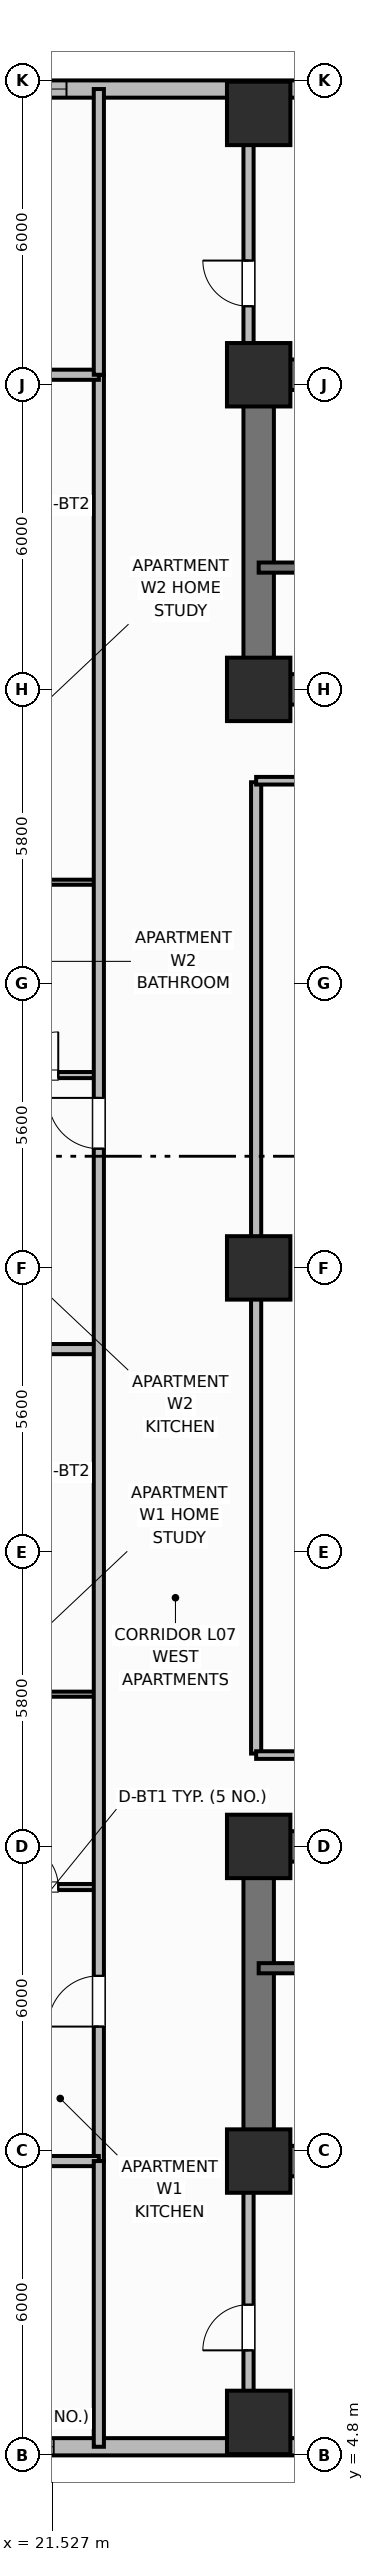
"""IFC4 building model, lengths in metres.
Left out: names, types, materials, properties, quantities, classifications, styles, units other than length and angle.
Written with IfcOpenShell. Run it as: python <this file> out.ifc"""

import sys

from ifc_helpers import new_model, si_unit, direction, frame, frame_2d, origin, origin_2d, place, context, subcontext, project, spatial, rectangle, extrude, element, fill, save


model = new_model("IFC4")
c1 = context("Model", 3, precision=1e-05, world=origin(), true_north=direction((0.0, 1.0)))
c2 = subcontext(c1, "Body", "Model", "MODEL_VIEW")
j1 = project(units=[si_unit("LENGTHUNIT", "METRE"), si_unit("PLANEANGLEUNIT", "RADIAN")], contexts=[c1])
p1 = place(None, origin())
s1 = spatial("IfcSite", under=j1, at=p1, CompositionType="ELEMENT")
p2 = place(p1, origin())
s2 = spatial("IfcBuilding", under=s1, at=p2, CompositionType="ELEMENT")
p3 = place(p2, frame((0.0, 0.0, 32.5)))
s3 = spatial("IfcBuildingStorey", under=s2, at=p3, CompositionType="ELEMENT", Elevation=32.5)
p4 = place(p3, frame((52.8, 10.6, 0.0), z_axis=(0.0, 0.0, 1.0), x_axis=(-1.0, 0.0, 0.0)))
e1 = element("IfcWall", 1, at=p4, inside=s3, PredefinedType="SHEAR", context=c2, shape_type="SweptSolid", body=[
    extrude(rectangle(XDim=27.2, YDim=0.6, at=frame_2d((13.6, 0.0))), origin(), (0.0, 0.0, 1.0), 3.7),
])
p5 = place(p3, frame((25.6, 10.9, 0.0), z_axis=(0.0, 0.0, 1.0), x_axis=(0.0, 1.0, 0.0)))
e2 = element("IfcWall", 2, at=p5, inside=s3, PredefinedType="SHEAR", context=c2, shape_type="SweptSolid", body=[
    extrude(rectangle(XDim=5.6, YDim=0.6, at=frame_2d((2.8, 0.0))), origin(), (0.0, 0.0, 1.0), 3.7),
])
p6 = place(p3, frame((25.6, 16.8, 0.0), z_axis=(0.0, 0.0, 1.0), x_axis=(1.0, 0.0, 0.0)))
e3 = element("IfcWall", 3, at=p6, inside=s3, PredefinedType="SHEAR", context=c2, shape_type="SweptSolid", body=[
    extrude(rectangle(XDim=27.2, YDim=0.6, at=frame_2d((13.6, 0.0))), origin(), (0.0, 0.0, 1.0), 3.7),
])
p7 = place(p6, frame((1.9, 0.0, 0.0)))
e4 = element("IfcOpeningElement", 4, at=p7, cuts=e3, PredefinedType="OPENING", context=c2, shape_type="SweptSolid", body=[
    extrude(rectangle(XDim=1.1, YDim=2.15, at=frame_2d((0.55, 1.075))), frame((0.0, 0.31, 0.0), z_axis=(0.0, -1.0, 0.0), x_axis=(1.0, 0.0, 0.0)), (0.0, 0.0, 1.0), 0.62),
])
p8 = place(p6, frame((13.0, 0.0, 0.0)))
e5 = element("IfcOpeningElement", 5, at=p8, cuts=e3, PredefinedType="OPENING", context=c2, shape_type="SweptSolid", body=[
    extrude(rectangle(XDim=1.2, YDim=2.15, at=frame_2d((0.6, 1.075))), frame((0.0, 0.31, 0.0), z_axis=(0.0, -1.0, 0.0), x_axis=(1.0, 0.0, 0.0)), (0.0, 0.0, 1.0), 0.62),
])
p9 = place(p6, frame((20.4, 0.0, 0.0)))
e6 = element("IfcOpeningElement", 6, at=p9, cuts=e3, PredefinedType="OPENING", context=c2, shape_type="SweptSolid", body=[
    extrude(rectangle(XDim=1.3, YDim=2.2, at=frame_2d((0.65, 1.1))), frame((0.0, 0.31, 0.0), z_axis=(0.0, -1.0, 0.0), x_axis=(1.0, 0.0, 0.0)), (0.0, 0.0, 1.0), 0.62),
])
p10 = place(p6, frame((24.65, 0.0, 0.0)))
e7 = element("IfcOpeningElement", 7, at=p10, cuts=e3, PredefinedType="OPENING", context=c2, shape_type="SweptSolid", body=[
    extrude(rectangle(XDim=0.85, YDim=2.1, at=frame_2d((0.425, 1.05))), frame((0.0, 0.31, 0.0), z_axis=(0.0, -1.0, 0.0), x_axis=(1.0, 0.0, 0.0)), (0.0, 0.0, 1.0), 0.62),
])
p11 = place(p3, frame((25.6, 45.8, 0.0), z_axis=(0.0, 0.0, 1.0), x_axis=(1.0, 0.0, 0.0)))
e8 = element("IfcWall", 8, at=p11, inside=s3, PredefinedType="SHEAR", context=c2, shape_type="SweptSolid", body=[
    extrude(rectangle(XDim=27.2, YDim=0.6, at=frame_2d((13.6, 0.0))), origin(), (0.0, 0.0, 1.0), 3.7),
])
p12 = place(p3, frame((25.6, 39.9, 0.0), z_axis=(0.0, 0.0, 1.0), x_axis=(0.0, 1.0, 0.0)))
e9 = element("IfcWall", 9, at=p12, inside=s3, PredefinedType="SHEAR", context=c2, shape_type="SweptSolid", body=[
    extrude(rectangle(XDim=5.6, YDim=0.6, at=frame_2d((2.8, 0.0))), origin(), (0.0, 0.0, 1.0), 3.7),
])
p13 = place(p3, frame((52.8, 39.6, 0.0), z_axis=(0.0, 0.0, 1.0), x_axis=(-1.0, 0.0, 0.0)))
e10 = element("IfcWall", 10, at=p13, inside=s3, PredefinedType="SHEAR", context=c2, shape_type="SweptSolid", body=[
    extrude(rectangle(XDim=27.2, YDim=0.6, at=frame_2d((13.6, 0.0))), origin(), (0.0, 0.0, 1.0), 3.7),
])
p14 = place(p13, frame((24.2, 0.0, 0.0)))
e11 = element("IfcOpeningElement", 11, at=p14, cuts=e10, PredefinedType="OPENING", context=c2, shape_type="SweptSolid", body=[
    extrude(rectangle(XDim=1.1, YDim=2.15, at=frame_2d((0.55, 1.075))), frame((0.0, 0.31, 0.0), z_axis=(0.0, -1.0, 0.0), x_axis=(1.0, 0.0, 0.0)), (0.0, 0.0, 1.0), 0.62),
])
p15 = place(p13, frame((15.1, 0.0, 0.0)))
e12 = element("IfcOpeningElement", 12, at=p15, cuts=e10, PredefinedType="OPENING", context=c2, shape_type="SweptSolid", body=[
    extrude(rectangle(XDim=1.2, YDim=2.15, at=frame_2d((0.6, 1.075))), frame((0.0, 0.31, 0.0), z_axis=(0.0, -1.0, 0.0), x_axis=(1.0, 0.0, 0.0)), (0.0, 0.0, 1.0), 0.62),
])
p16 = place(p13, frame((11.6, 0.0, 0.0)))
e13 = element("IfcOpeningElement", 13, at=p16, cuts=e10, PredefinedType="OPENING", context=c2, shape_type="SweptSolid", body=[
    extrude(rectangle(XDim=0.9, YDim=2.1, at=frame_2d((0.45, 1.05))), frame((0.0, 0.31, 0.0), z_axis=(0.0, -1.0, 0.0), x_axis=(1.0, 0.0, 0.0)), (0.0, 0.0, 1.0), 0.62),
])
p17 = place(p13, frame((3.6, 0.0, 0.0)))
e14 = element("IfcOpeningElement", 14, at=p17, cuts=e10, PredefinedType="OPENING", context=c2, shape_type="SweptSolid", body=[
    extrude(rectangle(XDim=1.0, YDim=2.15, at=frame_2d((0.5, 1.075))), frame((0.0, 0.31, 0.0), z_axis=(0.0, -1.0, 0.0), x_axis=(1.0, 0.0, 0.0)), (0.0, 0.0, 1.0), 0.62),
])
for number, where, z_axis, x_axis in (
    (15, (25.6, 10.6, 0.0), (0.0, 0.0, 1.0), (1.0, 0.0, 0.0)),
    (16, (25.6, 16.8, 0.0), (0.0, 0.0, 1.0), (1.0, 0.0, 0.0)),
    (17, (25.6, 39.6, 0.0), (0.0, 0.0, 1.0), (1.0, 0.0, 0.0)),
    (18, (25.6, 45.8, 0.0), (0.0, 0.0, 1.0), (1.0, 0.0, 0.0)),
    (19, (25.6, 28.2, 0.0), (0.0, 0.0, 1.0), (1.0, 0.0, 0.0)),
    (20, (25.6, 5.45, 0.0), (0.0, 0.0, 1.0), (1.0, 0.0, 0.0)),
    (21, (25.6, 50.95, 0.0), (0.0, 0.0, 1.0), (1.0, 0.0, 0.0)),
):
    element("IfcColumn", number, at=place(p3, frame(where, z_axis=z_axis, x_axis=x_axis)), inside=s3, PredefinedType="COLUMN", context=c2, shape_type="SweptSolid", body=[
        extrude(rectangle(XDim=1.25, YDim=1.25, at=origin_2d()), origin(), (0.0, 0.0, 1.0), 3.7),
    ])
p18 = place(p3, frame((18.6, 4.97, 0.0), z_axis=(0.0, 0.0, 1.0), x_axis=(1.0, 0.0, 0.0)))
e22 = element("IfcWall", 22, at=p18, inside=s3, PredefinedType="SOLIDWALL", context=c2, shape_type="SweptSolid", body=[
    extrude(rectangle(XDim=17.4, YDim=0.34, at=frame_2d((8.7, 0.0))), origin(), (0.0, 0.0, 1.0), 2.7),
])
p19 = place(p18, frame((1.56, 0.0, 0.73)))
e23 = element("IfcOpeningElement", 23, at=p19, cuts=e22, PredefinedType="OPENING", context=c2, shape_type="SweptSolid", body=[
    extrude(rectangle(XDim=1.4, YDim=1.85, at=frame_2d((0.7, 0.925))), frame((0.0, 0.18, 0.0), z_axis=(0.0, -1.0, 0.0), x_axis=(1.0, 0.0, 0.0)), (0.0, 0.0, 1.0), 0.36),
])
p20 = place(p18, frame((8.35, 0.0, 0.73)))
e24 = element("IfcOpeningElement", 24, at=p20, cuts=e22, PredefinedType="OPENING", context=c2, shape_type="SweptSolid", body=[
    extrude(rectangle(XDim=1.4, YDim=1.85, at=frame_2d((0.7, 0.925))), frame((0.0, 0.18, 0.0), z_axis=(0.0, -1.0, 0.0), x_axis=(1.0, 0.0, 0.0)), (0.0, 0.0, 1.0), 0.36),
])
p21 = place(p18, frame((11.22, 0.0, 0.73)))
e25 = element("IfcOpeningElement", 25, at=p21, cuts=e22, PredefinedType="OPENING", context=c2, shape_type="SweptSolid", body=[
    extrude(rectangle(XDim=1.4, YDim=1.85, at=frame_2d((0.7, 0.925))), frame((0.0, 0.18, 0.0), z_axis=(0.0, -1.0, 0.0), x_axis=(1.0, 0.0, 0.0)), (0.0, 0.0, 1.0), 0.36),
])
p22 = place(p18, frame((13.74, 0.0, 0.73)))
e26 = element("IfcOpeningElement", 26, at=p22, cuts=e22, PredefinedType="OPENING", context=c2, shape_type="SweptSolid", body=[
    extrude(rectangle(XDim=1.4, YDim=1.85, at=frame_2d((0.7, 0.925))), frame((0.0, 0.18, 0.0), z_axis=(0.0, -1.0, 0.0), x_axis=(1.0, 0.0, 0.0)), (0.0, 0.0, 1.0), 0.36),
])
p23 = place(p3, frame((36.0, 51.43, 0.0), z_axis=(0.0, 0.0, 1.0), x_axis=(-1.0, 0.0, 0.0)))
e27 = element("IfcWall", 27, at=p23, inside=s3, PredefinedType="SOLIDWALL", context=c2, shape_type="SweptSolid", body=[
    extrude(rectangle(XDim=17.4, YDim=0.34, at=frame_2d((8.7, 0.0))), origin(), (0.0, 0.0, 1.0), 2.7),
])
p24 = place(p23, frame((5.788, 0.0, 0.73)))
e28 = element("IfcOpeningElement", 28, at=p24, cuts=e27, PredefinedType="OPENING", context=c2, shape_type="SweptSolid", body=[
    extrude(rectangle(XDim=1.8, YDim=1.85, at=frame_2d((0.9, 0.925))), frame((0.0, 0.18, 0.0), z_axis=(0.0, -1.0, 0.0), x_axis=(1.0, 0.0, 0.0)), (0.0, 0.0, 1.0), 0.36),
])
p25 = place(p23, frame((14.188, 0.0, 0.73)))
e29 = element("IfcOpeningElement", 29, at=p25, cuts=e27, PredefinedType="OPENING", context=c2, shape_type="SweptSolid", body=[
    extrude(rectangle(XDim=1.8, YDim=1.85, at=frame_2d((0.9, 0.925))), frame((0.0, 0.18, 0.0), z_axis=(0.0, -1.0, 0.0), x_axis=(1.0, 0.0, 0.0)), (0.0, 0.0, 1.0), 0.36),
])
p26 = place(p3, frame((25.6, 14.4, 0.0), z_axis=(0.0, 0.0, 1.0), x_axis=(1.0, 0.0, 0.0)))
e30 = element("IfcWall", 30, at=p26, inside=s3, PredefinedType="SHEAR", context=c2, shape_type="SweptSolid", body=[
    extrude(rectangle(XDim=9.55, YDim=0.2, at=frame_2d((4.775, 0.0))), origin(), (0.0, 0.0, 1.0), 3.7),
])
p27 = place(p26, frame((1.05, 0.0, 0.0)))
e31 = element("IfcOpeningElement", 31, at=p27, cuts=e30, PredefinedType="OPENING", context=c2, shape_type="SweptSolid", body=[
    extrude(rectangle(XDim=1.1, YDim=2.15, at=frame_2d((0.55, 1.075))), frame((0.0, 0.11, 0.0), z_axis=(0.0, -1.0, 0.0), x_axis=(1.0, 0.0, 0.0)), (0.0, 0.0, 1.0), 0.22),
])
p28 = place(p3, frame((35.15, 42.0, 0.0), z_axis=(0.0, 0.0, 1.0), x_axis=(-1.0, 0.0, 0.0)))
e32 = element("IfcWall", 32, at=p28, inside=s3, PredefinedType="SHEAR", context=c2, shape_type="SweptSolid", body=[
    extrude(rectangle(XDim=9.55, YDim=0.2, at=frame_2d((4.775, 0.0))), origin(), (0.0, 0.0, 1.0), 3.7),
])
p29 = place(p28, frame((7.25, 0.0, 0.0)))
e33 = element("IfcOpeningElement", 33, at=p29, cuts=e32, PredefinedType="OPENING", context=c2, shape_type="SweptSolid", body=[
    extrude(rectangle(XDim=1.1, YDim=2.15, at=frame_2d((0.55, 1.075))), frame((0.0, 0.11, 0.0), z_axis=(0.0, -1.0, 0.0), x_axis=(1.0, 0.0, 0.0)), (0.0, 0.0, 1.0), 0.22),
])
p30 = place(p3, frame((25.55, 18.63, 0.0), z_axis=(0.0, 0.0, 1.0), x_axis=(0.0, 1.0, 0.0)))
e34 = element("IfcWall", 34, at=p30, inside=s3, PredefinedType="PARTITIONING", context=c2, shape_type="SweptSolid", body=[
    extrude(rectangle(XDim=19.14, YDim=0.2, at=frame_2d((9.57, 0.0))), origin(), (0.0, 0.0, 1.0), 2.53),
])
for number, where, z_axis, x_axis in (
    (35, (25.55, 18.6, 0.0), (0.0, 0.0, 1.0), (1.0, 0.0, 0.0)),
    (36, (25.55, 37.8, 0.0), (0.0, 0.0, 1.0), (1.0, 0.0, 0.0)),
):
    element("IfcWall", number, at=place(p3, frame(where, z_axis=z_axis, x_axis=x_axis)), inside=s3, PredefinedType="PARTITIONING", context=c2, shape_type="SweptSolid", body=[
        extrude(rectangle(XDim=12.5, YDim=0.15, at=frame_2d((6.25, 0.0))), origin(), (0.0, 0.0, 1.0), 2.53),
    ])
p31 = place(p3, frame((20.2, 16.0, 0.0), z_axis=(0.0, 0.0, 1.0), x_axis=(1.0, 0.0, 0.0)))
e37 = element("IfcWall", 37, at=p31, inside=s3, PredefinedType="PARTITIONING", context=c2, shape_type="SweptSolid", body=[
    extrude(rectangle(XDim=2.25, YDim=0.12, at=frame_2d((1.125, 0.0))), origin(), (0.0, 0.0, 1.0), 2.53),
])
p32 = place(p31, frame((0.6, 0.0, 0.0)))
e38 = element("IfcOpeningElement", 38, at=p32, cuts=e37, PredefinedType="OPENING", context=c2, shape_type="SweptSolid", body=[
    extrude(rectangle(XDim=0.85, YDim=2.1, at=frame_2d((0.425, 1.05))), frame((0.0, 0.07, 0.0), z_axis=(0.0, -1.0, 0.0), x_axis=(1.0, 0.0, 0.0)), (0.0, 0.0, 1.0), 0.14),
])
p33 = place(p3, frame((20.2, 19.8, 0.0), z_axis=(0.0, 0.0, 1.0), x_axis=(1.0, 0.0, 0.0)))
e39 = element("IfcWall", 39, at=p33, inside=s3, PredefinedType="PARTITIONING", context=c2, shape_type="SweptSolid", body=[
    extrude(rectangle(XDim=2.25, YDim=0.1, at=frame_2d((1.125, 0.0))), origin(), (0.0, 0.0, 1.0), 2.53),
])
p34 = place(p3, frame((14.884, 26.6, 0.0), z_axis=(0.0, 0.0, 1.0), x_axis=(1.0, 0.0, 0.0)))
e40 = element("IfcWall", 40, at=p34, inside=s3, PredefinedType="PARTITIONING", context=c2, shape_type="SweptSolid", body=[
    extrude(rectangle(XDim=7.566, YDim=0.2, at=frame_2d((3.783, 0.0))), origin(), (0.0, 0.0, 1.0), 2.53),
])
p35 = place(p3, frame((20.2, 32.0, 0.0), z_axis=(0.0, 0.0, 1.0), x_axis=(1.0, 0.0, 0.0)))
e41 = element("IfcWall", 41, at=p35, inside=s3, PredefinedType="PARTITIONING", context=c2, shape_type="SweptSolid", body=[
    extrude(rectangle(XDim=2.25, YDim=0.12, at=frame_2d((1.125, 0.0))), origin(), (0.0, 0.0, 1.0), 2.53),
])
p36 = place(p35, frame((0.6, 0.0, 0.0)))
e42 = element("IfcOpeningElement", 42, at=p36, cuts=e41, PredefinedType="OPENING", context=c2, shape_type="SweptSolid", body=[
    extrude(rectangle(XDim=0.85, YDim=2.1, at=frame_2d((0.425, 1.05))), frame((0.0, 0.07, 0.0), z_axis=(0.0, -1.0, 0.0), x_axis=(1.0, 0.0, 0.0)), (0.0, 0.0, 1.0), 0.14),
])
p37 = place(p3, frame((20.2, 35.8, 0.0), z_axis=(0.0, 0.0, 1.0), x_axis=(1.0, 0.0, 0.0)))
e43 = element("IfcWall", 43, at=p37, inside=s3, PredefinedType="PARTITIONING", context=c2, shape_type="SweptSolid", body=[
    extrude(rectangle(XDim=2.25, YDim=0.1, at=frame_2d((1.125, 0.0))), origin(), (0.0, 0.0, 1.0), 2.53),
])
p38 = place(p3, frame((22.45, 10.6, 0.0), z_axis=(0.0, 0.0, 1.0), x_axis=(0.0, 1.0, 0.0)))
e44 = element("IfcWall", 44, at=p38, inside=s3, PredefinedType="PARTITIONING", context=c2, shape_type="SweptSolid", body=[
    extrude(rectangle(XDim=35.2, YDim=0.2, at=frame_2d((17.6, 0.0))), origin(), (0.0, 0.0, 1.0), 2.53),
])
p39 = place(p38, frame((2.65, 0.0, 0.0)))
e45 = element("IfcOpeningElement", 45, at=p39, cuts=e44, PredefinedType="OPENING", context=c2, shape_type="SweptSolid", body=[
    extrude(rectangle(XDim=1.0, YDim=2.15, at=frame_2d((0.5, 1.075))), frame((0.0, 0.11, 0.0), z_axis=(0.0, -1.0, 0.0), x_axis=(1.0, 0.0, 0.0)), (0.0, 0.0, 1.0), 0.22),
])
p40 = place(p38, frame((19.95, 0.0, 0.0)))
e46 = element("IfcOpeningElement", 46, at=p40, cuts=e44, PredefinedType="OPENING", context=c2, shape_type="SweptSolid", body=[
    extrude(rectangle(XDim=1.0, YDim=2.15, at=frame_2d((0.5, 1.075))), frame((0.0, 0.11, 0.0), z_axis=(0.0, -1.0, 0.0), x_axis=(1.0, 0.0, 0.0)), (0.0, 0.0, 1.0), 0.22),
])
for number, where, z_axis, x_axis in (
    (47, (14.99, 10.6, 0.0), (0.0, 0.0, 1.0), (1.0, 0.0, 0.0)),
    (48, (14.99, 45.8, 0.0), (0.0, 0.0, 1.0), (1.0, 0.0, 0.0)),
):
    element("IfcWall", number, at=place(p3, frame(where, z_axis=z_axis, x_axis=x_axis)), inside=s3, PredefinedType="PARTITIONING", context=c2, shape_type="SweptSolid", body=[
        extrude(rectangle(XDim=7.46, YDim=0.2, at=frame_2d((3.73, 0.0))), origin(), (0.0, 0.0, 1.0), 2.53),
    ])
p41 = place(p3, frame((22.45, 4.97, 0.0), z_axis=(0.0, 0.0, 1.0), x_axis=(0.0, 1.0, 0.0)))
e49 = element("IfcWall", 49, at=p41, inside=s3, PredefinedType="PARTITIONING", context=c2, shape_type="SweptSolid", body=[
    extrude(rectangle(XDim=5.63, YDim=0.2, at=frame_2d((2.815, 0.0))), origin(), (0.0, 0.0, 1.0), 2.53),
])
p42 = place(p3, frame((22.45, 45.8, 0.0), z_axis=(0.0, 0.0, 1.0), x_axis=(0.0, 1.0, 0.0)))
e50 = element("IfcWall", 50, at=p42, inside=s3, PredefinedType="PARTITIONING", context=c2, shape_type="SweptSolid", body=[
    extrude(rectangle(XDim=5.63, YDim=0.2, at=frame_2d((2.815, 0.0))), origin(), (0.0, 0.0, 1.0), 2.53),
])
p43 = place(p3, frame((25.4, 5.57, 0.0), z_axis=(0.0, 0.0, 1.0), x_axis=(0.0, 1.0, 0.0)))
e51 = element("IfcWall", 51, at=p43, inside=s3, PredefinedType="PARTITIONING", context=c2, shape_type="SweptSolid", body=[
    extrude(rectangle(XDim=4.73, YDim=0.2, at=frame_2d((2.365, 0.0))), origin(), (0.0, 0.0, 1.0), 2.53),
])
p44 = place(p43, frame((1.3, 0.0, 0.0)))
e52 = element("IfcOpeningElement", 52, at=p44, cuts=e51, PredefinedType="OPENING", context=c2, shape_type="SweptSolid", body=[
    extrude(rectangle(XDim=0.9, YDim=2.1, at=frame_2d((0.45, 1.05))), frame((0.0, 0.11, 0.0), z_axis=(0.0, -1.0, 0.0), x_axis=(1.0, 0.0, 0.0)), (0.0, 0.0, 1.0), 0.22),
])
p45 = place(p3, frame((25.4, 46.1, 0.0), z_axis=(0.0, 0.0, 1.0), x_axis=(0.0, 1.0, 0.0)))
e53 = element("IfcWall", 53, at=p45, inside=s3, PredefinedType="PARTITIONING", context=c2, shape_type="SweptSolid", body=[
    extrude(rectangle(XDim=4.73, YDim=0.2, at=frame_2d((2.365, 0.0))), origin(), (0.0, 0.0, 1.0), 2.53),
])
p46 = place(p45, frame((1.05, 0.0, 0.0)))
e54 = element("IfcOpeningElement", 54, at=p46, cuts=e53, PredefinedType="OPENING", context=c2, shape_type="SweptSolid", body=[
    extrude(rectangle(XDim=0.9, YDim=2.1, at=frame_2d((0.45, 1.05))), frame((0.0, 0.11, 0.0), z_axis=(0.0, -1.0, 0.0), x_axis=(1.0, 0.0, 0.0)), (0.0, 0.0, 1.0), 0.22),
])
p47 = place(p19, origin())
e55 = element("IfcWindow", 55, at=p47, inside=s3, PartitioningType="SINGLE_PANEL", PredefinedType="WINDOW", context=c2, shape_type="SweptSolid", body=[
    extrude(rectangle(XDim=1.4, YDim=1.85, at=frame_2d((0.7, 0.925))), frame((0.0, 0.03, 0.0), z_axis=(0.0, -1.0, 0.0), x_axis=(1.0, 0.0, 0.0)), (0.0, 0.0, 1.0), 0.06),
])
fill(e23, e55)
p48 = place(p25, origin())
e56 = element("IfcWindow", 56, at=p48, inside=s3, PartitioningType="SINGLE_PANEL", PredefinedType="WINDOW", context=c2, shape_type="SweptSolid", body=[
    extrude(rectangle(XDim=1.8, YDim=1.85, at=frame_2d((0.9, 0.925))), frame((0.0, 0.03, 0.0), z_axis=(0.0, -1.0, 0.0), x_axis=(1.0, 0.0, 0.0)), (0.0, 0.0, 1.0), 0.06),
])
fill(e29, e56)
p49 = place(p32, origin())
e57 = element("IfcDoor", 57, at=p49, inside=s3, OperationType="SINGLE_SWING_LEFT", PredefinedType="DOOR", context=c2, shape_type="SweptSolid", body=[
    extrude(rectangle(XDim=0.85, YDim=2.1, at=frame_2d((0.425, 1.05))), frame((0.0, 0.025, 0.0), z_axis=(0.0, -1.0, 0.0), x_axis=(1.0, 0.0, 0.0)), (0.0, 0.0, 1.0), 0.05),
])
fill(e38, e57)
p50 = place(p36, origin())
e58 = element("IfcDoor", 58, at=p50, inside=s3, OperationType="SINGLE_SWING_RIGHT", PredefinedType="DOOR", context=c2, shape_type="SweptSolid", body=[
    extrude(rectangle(XDim=0.85, YDim=2.1, at=frame_2d((0.425, 1.05))), frame((0.0, 0.025, 0.0), z_axis=(0.0, -1.0, 0.0), x_axis=(1.0, 0.0, 0.0)), (0.0, 0.0, 1.0), 0.05),
])
fill(e42, e58)
p51 = place(p39, origin())
e59 = element("IfcDoor", 59, at=p51, inside=s3, OperationType="SINGLE_SWING_LEFT", PredefinedType="DOOR", context=c2, shape_type="SweptSolid", body=[
    extrude(rectangle(XDim=1.0, YDim=2.15, at=frame_2d((0.5, 1.075))), frame((0.0, 0.025, 0.0), z_axis=(0.0, -1.0, 0.0), x_axis=(1.0, 0.0, 0.0)), (0.0, 0.0, 1.0), 0.05),
])
fill(e45, e59)
p52 = place(p40, origin())
e60 = element("IfcDoor", 60, at=p52, inside=s3, OperationType="SINGLE_SWING_RIGHT", PredefinedType="DOOR", context=c2, shape_type="SweptSolid", body=[
    extrude(rectangle(XDim=1.0, YDim=2.15, at=frame_2d((0.5, 1.075))), frame((0.0, 0.025, 0.0), z_axis=(0.0, -1.0, 0.0), x_axis=(1.0, 0.0, 0.0)), (0.0, 0.0, 1.0), 0.05),
])
fill(e46, e60)
p53 = place(p44, origin())
e61 = element("IfcDoor", 61, at=p53, inside=s3, OperationType="SINGLE_SWING_LEFT", PredefinedType="DOOR", context=c2, shape_type="SweptSolid", body=[
    extrude(rectangle(XDim=0.9, YDim=2.1, at=frame_2d((0.45, 1.05))), frame((0.0, 0.025, 0.0), z_axis=(0.0, -1.0, 0.0), x_axis=(1.0, 0.0, 0.0)), (0.0, 0.0, 1.0), 0.05),
])
fill(e52, e61)
p54 = place(p46, origin())
e62 = element("IfcDoor", 62, at=p54, inside=s3, OperationType="SINGLE_SWING_RIGHT", PredefinedType="DOOR", context=c2, shape_type="SweptSolid", body=[
    extrude(rectangle(XDim=0.9, YDim=2.1, at=frame_2d((0.45, 1.05))), frame((0.0, 0.025, 0.0), z_axis=(0.0, -1.0, 0.0), x_axis=(1.0, 0.0, 0.0)), (0.0, 0.0, 1.0), 0.05),
])
fill(e54, e62)
save(model, sys.argv[1])
